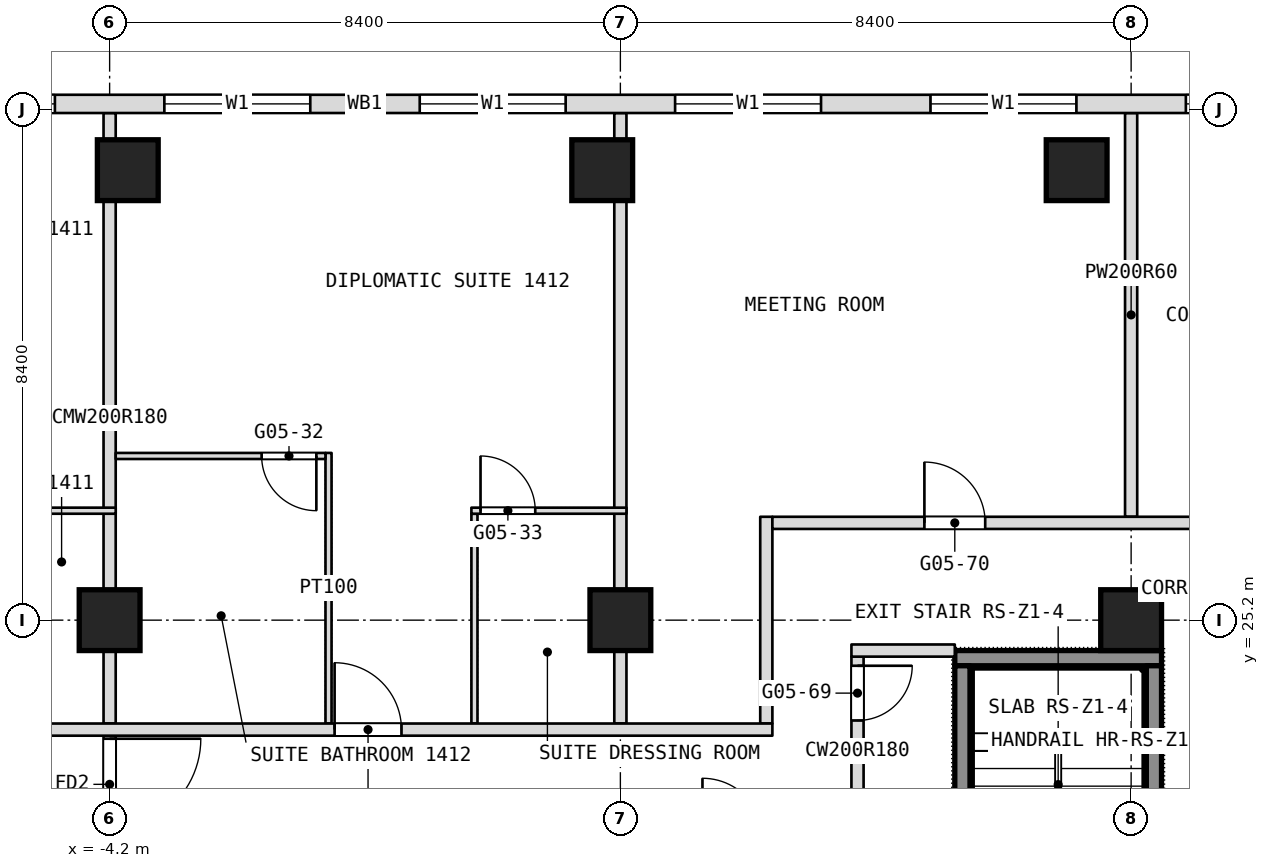
"""IFC4 building model, lengths in metres.
Left out: names, types, materials, properties, quantities, classifications, styles, units other than length and angle.
Written with IfcOpenShell. Run it as: python <this file> out.ifc"""

import sys

from ifc_helpers import new_model, si_unit, direction, frame, frame_2d, origin, origin_2d, place, context, subcontext, project, spatial, rectangle, extrude, element, fill, save


model = new_model("IFC4")
c1 = context("Model", 3, precision=1e-05, world=origin(), true_north=direction((0.0, 1.0)))
c2 = subcontext(c1, "Body", "Model", "MODEL_VIEW")
j1 = project(units=[si_unit("LENGTHUNIT", "METRE"), si_unit("PLANEANGLEUNIT", "RADIAN")], contexts=[c1])
p1 = place(None, origin())
s1 = spatial("IfcSite", under=j1, at=p1, CompositionType="ELEMENT")
p2 = place(p1, origin())
s2 = spatial("IfcBuilding", under=s1, at=p2, CompositionType="ELEMENT")
p3 = place(p2, frame((0.0, 0.0, 65.3)))
s3 = spatial("IfcBuildingStorey", under=s2, at=p3, CompositionType="ELEMENT", Elevation=65.3)
for number, where, z_axis, x_axis in (
    (1, (-4.2, 25.2, 0.0), (0.0, 0.0, 1.0), (1.0, 0.0, 0.0)),
    (2, (4.2, 25.2, 0.0), (0.0, 0.0, 1.0), (1.0, 0.0, 0.0)),
    (3, (12.6, 25.2, 0.0), (0.0, 0.0, 1.0), (1.0, 0.0, 0.0)),
    (4, (-3.901, 32.6, 0.0), (0.0, 0.0, 1.0), (1.0, 0.0, 0.0)),
    (5, (3.901, 32.6, 0.0), (0.0, 0.0, 1.0), (1.0, 0.0, 0.0)),
    (6, (11.704, 32.6, 0.0), (0.0, 0.0, 1.0), (1.0, 0.0, 0.0)),
):
    element("IfcColumn", number, at=place(p3, frame(where, z_axis=z_axis, x_axis=x_axis)), inside=s3, PredefinedType="COLUMN", context=c2, shape_type="SweptSolid", body=[
        extrude(rectangle(XDim=1.0, YDim=1.0, at=origin_2d()), origin(), (0.0, 0.0, 1.0), 3.6),
    ])
p4 = place(p3, frame((12.6, 26.9, 0.0), z_axis=(0.0, 0.0, 1.0), x_axis=(0.0, 1.0, 0.0)))
e7 = element("IfcWall", 7, at=p4, inside=s3, PredefinedType="PARTITIONING", context=c2, shape_type="SweptSolid", body=[
    extrude(rectangle(XDim=6.64, YDim=0.2, at=frame_2d((3.32, 0.0))), origin(), (0.0, 0.0, 1.0), 3.34),
])
p5 = place(p3, frame((8.1, 21.5, 0.0), z_axis=(0.0, 0.0, 1.0), x_axis=(0.0, 1.0, 0.0)))
e8 = element("IfcWall", 8, at=p5, inside=s3, PredefinedType="PARTITIONING", context=c2, shape_type="SweptSolid", body=[
    extrude(rectangle(XDim=3.1, YDim=0.2, at=frame_2d((1.55, 0.0))), origin(), (0.0, 0.0, 1.0), 3.34),
])
p6 = place(p5, frame((2.05, 0.0, 0.0)))
e9 = element("IfcOpeningElement", 9, at=p6, cuts=e8, PredefinedType="OPENING", context=c2, shape_type="SweptSolid", body=[
    extrude(rectangle(XDim=0.9, YDim=2.1, at=frame_2d((0.45, 1.05))), frame((0.0, 0.1, 0.0), z_axis=(0.0, -1.0, 0.0), x_axis=(1.0, 0.0, 0.0)), (0.0, 0.0, 1.0), 0.2),
])
p7 = place(p3, frame((6.6, 23.5, 0.0), z_axis=(0.0, 0.0, 1.0), x_axis=(0.0, 1.0, 0.0)))
e10 = element("IfcWall", 10, at=p7, inside=s3, PredefinedType="PARTITIONING", context=c2, shape_type="SweptSolid", body=[
    extrude(rectangle(XDim=3.4, YDim=0.2, at=frame_2d((1.7, 0.0))), origin(), (0.0, 0.0, 1.0), 3.34),
])
p8 = place(p3, frame((4.2, 23.5, 0.0), z_axis=(0.0, 0.0, 1.0), x_axis=(0.0, 1.0, 0.0)))
e11 = element("IfcWall", 11, at=p8, inside=s3, PredefinedType="PARTITIONING", context=c2, shape_type="SweptSolid", body=[
    extrude(rectangle(XDim=10.04, YDim=0.2, at=frame_2d((5.02, 0.0))), origin(), (0.0, 0.0, 1.0), 3.34),
])
p9 = place(p3, frame((1.8, 23.5, 0.0), z_axis=(0.0, 0.0, 1.0), x_axis=(0.0, 1.0, 0.0)))
e12 = element("IfcWall", 12, at=p9, inside=s3, PredefinedType="PARTITIONING", context=c2, shape_type="SweptSolid", body=[
    extrude(rectangle(XDim=3.45, YDim=0.1, at=frame_2d((1.725, 0.0))), origin(), (0.0, 0.0, 1.0), 3.34),
])
p10 = place(p3, frame((-0.6, 23.5, 0.0), z_axis=(0.0, 0.0, 1.0), x_axis=(0.0, 1.0, 0.0)))
e13 = element("IfcWall", 13, at=p10, inside=s3, PredefinedType="PARTITIONING", context=c2, shape_type="SweptSolid", body=[
    extrude(rectangle(XDim=4.45, YDim=0.1, at=frame_2d((2.225, 0.0))), origin(), (0.0, 0.0, 1.0), 3.34),
])
p11 = place(p3, frame((-4.2, 16.8, 0.0), z_axis=(0.0, 0.0, 1.0), x_axis=(0.0, 1.0, 0.0)))
e14 = element("IfcWall", 14, at=p11, inside=s3, PredefinedType="PARTITIONING", context=c2, shape_type="SweptSolid", body=[
    extrude(rectangle(XDim=6.7, YDim=0.2, at=frame_2d((3.35, 0.0))), origin(), (0.0, 0.0, 1.0), 3.34),
])
p12 = place(p11, frame((0.15, 0.0, 0.0)))
e15 = element("IfcOpeningElement", 15, at=p12, cuts=e14, PredefinedType="OPENING", context=c2, shape_type="SweptSolid", body=[
    extrude(rectangle(XDim=1.5, YDim=2.1, at=frame_2d((0.75, 1.05))), frame((0.0, 0.1, 0.0), z_axis=(0.0, -1.0, 0.0), x_axis=(1.0, 0.0, 0.0)), (0.0, 0.0, 1.0), 0.2),
])
p13 = place(p11, frame((4.95, 0.0, 0.0)))
e16 = element("IfcOpeningElement", 16, at=p13, cuts=e14, PredefinedType="OPENING", context=c2, shape_type="SweptSolid", body=[
    extrude(rectangle(XDim=1.5, YDim=2.1, at=frame_2d((0.75, 1.05))), frame((0.0, 0.1, 0.0), z_axis=(0.0, -1.0, 0.0), x_axis=(1.0, 0.0, 0.0)), (0.0, 0.0, 1.0), 0.2),
])
p14 = place(p3, frame((-4.2, 23.5, 0.0), z_axis=(0.0, 0.0, 1.0), x_axis=(0.0, 1.0, 0.0)))
e17 = element("IfcWall", 17, at=p14, inside=s3, PredefinedType="PARTITIONING", context=c2, shape_type="SweptSolid", body=[
    extrude(rectangle(XDim=10.04, YDim=0.2, at=frame_2d((5.02, 0.0))), origin(), (0.0, 0.0, 1.0), 3.34),
])
p15 = place(p3, frame((-16.7, 23.4, 0.0), z_axis=(0.0, 0.0, 1.0), x_axis=(1.0, 0.0, 0.0)))
e18 = element("IfcWall", 18, at=p15, inside=s3, PredefinedType="PARTITIONING", context=c2, shape_type="SweptSolid", body=[
    extrude(rectangle(XDim=23.4, YDim=0.2, at=frame_2d((11.7, 0.0))), origin(), (0.0, 0.0, 1.0), 3.34),
])
p16 = place(p15, frame((2.4, 0.0, 0.0)))
e19 = element("IfcOpeningElement", 19, at=p16, cuts=e18, PredefinedType="OPENING", context=c2, shape_type="SweptSolid", body=[
    extrude(rectangle(XDim=0.9, YDim=2.1, at=frame_2d((0.45, 1.05))), frame((0.0, 0.1, 0.0), z_axis=(0.0, -1.0, 0.0), x_axis=(1.0, 0.0, 0.0)), (0.0, 0.0, 1.0), 0.2),
])
p17 = place(p15, frame((5.65, 0.0, 0.0)))
e20 = element("IfcOpeningElement", 20, at=p17, cuts=e18, PredefinedType="OPENING", context=c2, shape_type="SweptSolid", body=[
    extrude(rectangle(XDim=1.1, YDim=2.1, at=frame_2d((0.55, 1.05))), frame((0.0, 0.1, 0.0), z_axis=(0.0, -1.0, 0.0), x_axis=(1.0, 0.0, 0.0)), (0.0, 0.0, 1.0), 0.2),
])
p18 = place(p15, frame((16.2, 0.0, 0.0)))
e21 = element("IfcOpeningElement", 21, at=p18, cuts=e18, PredefinedType="OPENING", context=c2, shape_type="SweptSolid", body=[
    extrude(rectangle(XDim=1.1, YDim=2.1, at=frame_2d((0.55, 1.05))), frame((0.0, 0.1, 0.0), z_axis=(0.0, -1.0, 0.0), x_axis=(1.0, 0.0, 0.0)), (0.0, 0.0, 1.0), 0.2),
])
p19 = place(p3, frame((8.0, 24.7, 0.0), z_axis=(0.0, 0.0, 1.0), x_axis=(1.0, 0.0, 0.0)))
e22 = element("IfcWall", 22, at=p19, inside=s3, PredefinedType="PARTITIONING", context=c2, shape_type="SweptSolid", body=[
    extrude(rectangle(XDim=1.7, YDim=0.2, at=frame_2d((0.85, 0.0))), origin(), (0.0, 0.0, 1.0), 3.34),
])
p20 = place(p3, frame((6.7, 26.8, 0.0), z_axis=(0.0, 0.0, 1.0), x_axis=(1.0, 0.0, 0.0)))
e23 = element("IfcWall", 23, at=p20, inside=s3, PredefinedType="PARTITIONING", context=c2, shape_type="SweptSolid", body=[
    extrude(rectangle(XDim=8.0, YDim=0.2, at=frame_2d((4.0, 0.0))), origin(), (0.0, 0.0, 1.0), 3.34),
])
p21 = place(p20, frame((2.5, 0.0, 0.0)))
e24 = element("IfcOpeningElement", 24, at=p21, cuts=e23, PredefinedType="OPENING", context=c2, shape_type="SweptSolid", body=[
    extrude(rectangle(XDim=1.0, YDim=2.1, at=frame_2d((0.5, 1.05))), frame((0.0, 0.1, 0.0), z_axis=(0.0, -1.0, 0.0), x_axis=(1.0, 0.0, 0.0)), (0.0, 0.0, 1.0), 0.2),
])
p22 = place(p3, frame((-6.65, 27.0, 0.0), z_axis=(0.0, 0.0, 1.0), x_axis=(1.0, 0.0, 0.0)))
e25 = element("IfcWall", 25, at=p22, inside=s3, PredefinedType="PARTITIONING", context=c2, shape_type="SweptSolid", body=[
    extrude(rectangle(XDim=2.55, YDim=0.1, at=frame_2d((1.275, 0.0))), origin(), (0.0, 0.0, 1.0), 3.34),
])
p23 = place(p3, frame((1.75, 27.0, 0.0), z_axis=(0.0, 0.0, 1.0), x_axis=(1.0, 0.0, 0.0)))
e26 = element("IfcWall", 26, at=p23, inside=s3, PredefinedType="PARTITIONING", context=c2, shape_type="SweptSolid", body=[
    extrude(rectangle(XDim=2.55, YDim=0.1, at=frame_2d((1.275, 0.0))), origin(), (0.0, 0.0, 1.0), 3.34),
])
p24 = place(p23, frame((0.15, 0.0, 0.0)))
e27 = element("IfcOpeningElement", 27, at=p24, cuts=e26, PredefinedType="OPENING", context=c2, shape_type="SweptSolid", body=[
    extrude(rectangle(XDim=0.9, YDim=2.1, at=frame_2d((0.45, 1.05))), frame((0.0, 0.05, 0.0), z_axis=(0.0, -1.0, 0.0), x_axis=(1.0, 0.0, 0.0)), (0.0, 0.0, 1.0), 0.1),
])
p25 = place(p3, frame((-4.1, 27.9, 0.0), z_axis=(0.0, 0.0, 1.0), x_axis=(1.0, 0.0, 0.0)))
e28 = element("IfcWall", 28, at=p25, inside=s3, PredefinedType="PARTITIONING", context=c2, shape_type="SweptSolid", body=[
    extrude(rectangle(XDim=3.45, YDim=0.1, at=frame_2d((1.725, 0.0))), origin(), (0.0, 0.0, 1.0), 3.34),
])
p26 = place(p25, frame((2.4, 0.0, 0.0)))
e29 = element("IfcOpeningElement", 29, at=p26, cuts=e28, PredefinedType="OPENING", context=c2, shape_type="SweptSolid", body=[
    extrude(rectangle(XDim=0.9, YDim=2.1, at=frame_2d((0.45, 1.05))), frame((0.0, 0.05, 0.0), z_axis=(0.0, -1.0, 0.0), x_axis=(1.0, 0.0, 0.0)), (0.0, 0.0, 1.0), 0.1),
])
p27 = place(p3, frame((23.406, 33.69, 0.0), z_axis=(0.0, 0.0, 1.0), x_axis=(-1.0, 0.0, 0.0)))
e30 = element("IfcWall", 30, at=p27, inside=s3, PredefinedType="NOTDEFINED", context=c2, shape_type="SweptSolid", body=[
    extrude(rectangle(XDim=46.812, YDim=0.3, at=frame_2d((23.406, 0.0))), origin(), (0.0, 0.0, 1.0), 3.6),
])
p28 = place(p27, frame((2.186, 0.0, 0.9)))
e31 = element("IfcOpeningElement", 31, at=p28, cuts=e30, PredefinedType="OPENING", context=c2, shape_type="SweptSolid", body=[
    extrude(rectangle(XDim=2.4, YDim=2.1, at=frame_2d((1.2, 1.05))), frame((0.0, 0.15, 0.0), z_axis=(0.0, -1.0, 0.0), x_axis=(1.0, 0.0, 0.0)), (0.0, 0.0, 1.0), 0.3),
])
p29 = place(p27, frame((7.506, 0.0, 0.9)))
e32 = element("IfcOpeningElement", 32, at=p29, cuts=e30, PredefinedType="OPENING", context=c2, shape_type="SweptSolid", body=[
    extrude(rectangle(XDim=2.4, YDim=2.1, at=frame_2d((1.2, 1.05))), frame((0.0, 0.15, 0.0), z_axis=(0.0, -1.0, 0.0), x_axis=(1.0, 0.0, 0.0)), (0.0, 0.0, 1.0), 0.3),
])
p30 = place(p27, frame((11.706, 0.0, 0.9)))
e33 = element("IfcOpeningElement", 33, at=p30, cuts=e30, PredefinedType="OPENING", context=c2, shape_type="SweptSolid", body=[
    extrude(rectangle(XDim=2.4, YDim=2.1, at=frame_2d((1.2, 1.05))), frame((0.0, 0.15, 0.0), z_axis=(0.0, -1.0, 0.0), x_axis=(1.0, 0.0, 0.0)), (0.0, 0.0, 1.0), 0.3),
])
p31 = place(p27, frame((15.906, 0.0, 0.9)))
e34 = element("IfcOpeningElement", 34, at=p31, cuts=e30, PredefinedType="OPENING", context=c2, shape_type="SweptSolid", body=[
    extrude(rectangle(XDim=2.4, YDim=2.1, at=frame_2d((1.2, 1.05))), frame((0.0, 0.15, 0.0), z_axis=(0.0, -1.0, 0.0), x_axis=(1.0, 0.0, 0.0)), (0.0, 0.0, 1.0), 0.3),
])
p32 = place(p27, frame((20.106, 0.0, 0.9)))
e35 = element("IfcOpeningElement", 35, at=p32, cuts=e30, PredefinedType="OPENING", context=c2, shape_type="SweptSolid", body=[
    extrude(rectangle(XDim=2.4, YDim=2.1, at=frame_2d((1.2, 1.05))), frame((0.0, 0.15, 0.0), z_axis=(0.0, -1.0, 0.0), x_axis=(1.0, 0.0, 0.0)), (0.0, 0.0, 1.0), 0.3),
])
p33 = place(p27, frame((24.306, 0.0, 0.9)))
e36 = element("IfcOpeningElement", 36, at=p33, cuts=e30, PredefinedType="OPENING", context=c2, shape_type="SweptSolid", body=[
    extrude(rectangle(XDim=2.4, YDim=2.1, at=frame_2d((1.2, 1.05))), frame((0.0, 0.15, 0.0), z_axis=(0.0, -1.0, 0.0), x_axis=(1.0, 0.0, 0.0)), (0.0, 0.0, 1.0), 0.3),
])
p34 = place(p27, frame((28.506, 0.0, 0.9)))
e37 = element("IfcOpeningElement", 37, at=p34, cuts=e30, PredefinedType="OPENING", context=c2, shape_type="SweptSolid", body=[
    extrude(rectangle(XDim=2.4, YDim=2.1, at=frame_2d((1.2, 1.05))), frame((0.0, 0.15, 0.0), z_axis=(0.0, -1.0, 0.0), x_axis=(1.0, 0.0, 0.0)), (0.0, 0.0, 1.0), 0.3),
])
p35 = place(p27, frame((32.706, 0.0, 0.9)))
e38 = element("IfcOpeningElement", 38, at=p35, cuts=e30, PredefinedType="OPENING", context=c2, shape_type="SweptSolid", body=[
    extrude(rectangle(XDim=2.4, YDim=2.1, at=frame_2d((1.2, 1.05))), frame((0.0, 0.15, 0.0), z_axis=(0.0, -1.0, 0.0), x_axis=(1.0, 0.0, 0.0)), (0.0, 0.0, 1.0), 0.3),
])
p36 = place(p27, frame((36.906, 0.0, 0.9)))
e39 = element("IfcOpeningElement", 39, at=p36, cuts=e30, PredefinedType="OPENING", context=c2, shape_type="SweptSolid", body=[
    extrude(rectangle(XDim=2.4, YDim=2.1, at=frame_2d((1.2, 1.05))), frame((0.0, 0.15, 0.0), z_axis=(0.0, -1.0, 0.0), x_axis=(1.0, 0.0, 0.0)), (0.0, 0.0, 1.0), 0.3),
])
p37 = place(p27, frame((42.226, 0.0, 0.9)))
e40 = element("IfcOpeningElement", 40, at=p37, cuts=e30, PredefinedType="OPENING", context=c2, shape_type="SweptSolid", body=[
    extrude(rectangle(XDim=2.4, YDim=2.1, at=frame_2d((1.2, 1.05))), frame((0.0, 0.15, 0.0), z_axis=(0.0, -1.0, 0.0), x_axis=(1.0, 0.0, 0.0)), (0.0, 0.0, 1.0), 0.3),
])
p38 = place(p3, frame((9.7, 24.575, 0.1), z_axis=(0.0, 0.0, 1.0), x_axis=(1.0, 0.0, 0.0)))
e41 = element("IfcWall", 41, at=p38, inside=s3, PredefinedType="SHEAR", context=c2, shape_type="SweptSolid", body=[
    extrude(rectangle(XDim=3.4, YDim=0.25, at=frame_2d((1.7, 0.0))), origin(), (0.0, 0.0, 1.0), 3.6),
])
p39 = place(p3, frame((9.825, 18.75, 0.1), z_axis=(0.0, 0.0, 1.0), x_axis=(0.0, 1.0, 0.0)))
e42 = element("IfcWall", 42, at=p39, inside=s3, PredefinedType="SHEAR", context=c2, shape_type="SweptSolid", body=[
    extrude(rectangle(XDim=5.7, YDim=0.25, at=frame_2d((2.85, 0.0))), origin(), (0.0, 0.0, 1.0), 3.6),
])
p40 = place(p39, frame((0.2, 0.0, 0.0)))
e43 = element("IfcOpeningElement", 43, at=p40, cuts=e42, PredefinedType="OPENING", context=c2, shape_type="SweptSolid", body=[
    extrude(rectangle(XDim=1.0, YDim=2.1, at=frame_2d((0.5, 1.05))), frame((0.0, 0.125, 0.0), z_axis=(0.0, -1.0, 0.0), x_axis=(1.0, 0.0, 0.0)), (0.0, 0.0, 1.0), 0.25),
])
p41 = place(p3, frame((12.975, 18.75, 0.1), z_axis=(0.0, 0.0, 1.0), x_axis=(0.0, 1.0, 0.0)))
e44 = element("IfcWall", 44, at=p41, inside=s3, PredefinedType="SHEAR", context=c2, shape_type="SweptSolid", body=[
    extrude(rectangle(XDim=5.7, YDim=0.25, at=frame_2d((2.85, 0.0))), origin(), (0.0, 0.0, 1.0), 3.6),
])
p42 = place(p6, origin())
e45 = element("IfcDoor", 45, at=p42, inside=s3, OperationType="SINGLE_SWING_LEFT", PredefinedType="DOOR", context=c2, shape_type="SweptSolid", body=[
    extrude(rectangle(XDim=0.9, YDim=2.1, at=frame_2d((0.45, 1.05))), frame((0.0, 0.025, 0.0), z_axis=(0.0, -1.0, 0.0), x_axis=(1.0, 0.0, 0.0)), (0.0, 0.0, 1.0), 0.05),
])
fill(e9, e45)
p43 = place(p18, origin())
e46 = element("IfcDoor", 46, at=p43, inside=s3, OperationType="SINGLE_SWING_LEFT", PredefinedType="DOOR", context=c2, shape_type="SweptSolid", body=[
    extrude(rectangle(XDim=1.1, YDim=2.1, at=frame_2d((0.55, 1.05))), frame((0.0, 0.025, 0.0), z_axis=(0.0, -1.0, 0.0), x_axis=(1.0, 0.0, 0.0)), (0.0, 0.0, 1.0), 0.05),
])
fill(e21, e46)
p44 = place(p21, origin())
e47 = element("IfcDoor", 47, at=p44, inside=s3, OperationType="SINGLE_SWING_RIGHT", PredefinedType="DOOR", context=c2, shape_type="SweptSolid", body=[
    extrude(rectangle(XDim=1.0, YDim=2.1, at=frame_2d((0.5, 1.05))), frame((0.0, 0.025, 0.0), z_axis=(0.0, -1.0, 0.0), x_axis=(1.0, 0.0, 0.0)), (0.0, 0.0, 1.0), 0.05),
])
fill(e24, e47)
p45 = place(p24, origin())
e48 = element("IfcDoor", 48, at=p45, inside=s3, OperationType="SINGLE_SWING_RIGHT", PredefinedType="DOOR", context=c2, shape_type="SweptSolid", body=[
    extrude(rectangle(XDim=0.9, YDim=2.1, at=frame_2d((0.45, 1.05))), frame((0.0, 0.025, 0.0), z_axis=(0.0, -1.0, 0.0), x_axis=(1.0, 0.0, 0.0)), (0.0, 0.0, 1.0), 0.05),
])
fill(e27, e48)
p46 = place(p26, origin())
e49 = element("IfcDoor", 49, at=p46, inside=s3, OperationType="SINGLE_SWING_LEFT", PredefinedType="DOOR", context=c2, shape_type="SweptSolid", body=[
    extrude(rectangle(XDim=0.9, YDim=2.1, at=frame_2d((0.45, 1.05))), frame((0.0, 0.025, 0.0), z_axis=(0.0, -1.0, 0.0), x_axis=(1.0, 0.0, 0.0)), (0.0, 0.0, 1.0), 0.05),
])
fill(e29, e49)
p47 = place(p29, origin())
e50 = element("IfcWindow", 50, at=p47, inside=s3, PartitioningType="SINGLE_PANEL", PredefinedType="WINDOW", context=c2, shape_type="SweptSolid", body=[
    extrude(rectangle(XDim=2.4, YDim=2.1, at=frame_2d((1.2, 1.05))), frame((0.0, 0.03, 0.0), z_axis=(0.0, -1.0, 0.0), x_axis=(1.0, 0.0, 0.0)), (0.0, 0.0, 1.0), 0.06),
])
fill(e32, e50)
p48 = place(p30, origin())
e51 = element("IfcWindow", 51, at=p48, inside=s3, PartitioningType="SINGLE_PANEL", PredefinedType="WINDOW", context=c2, shape_type="SweptSolid", body=[
    extrude(rectangle(XDim=2.4, YDim=2.1, at=frame_2d((1.2, 1.05))), frame((0.0, 0.03, 0.0), z_axis=(0.0, -1.0, 0.0), x_axis=(1.0, 0.0, 0.0)), (0.0, 0.0, 1.0), 0.06),
])
fill(e33, e51)
p49 = place(p31, origin())
e52 = element("IfcWindow", 52, at=p49, inside=s3, PartitioningType="SINGLE_PANEL", PredefinedType="WINDOW", context=c2, shape_type="SweptSolid", body=[
    extrude(rectangle(XDim=2.4, YDim=2.1, at=frame_2d((1.2, 1.05))), frame((0.0, 0.03, 0.0), z_axis=(0.0, -1.0, 0.0), x_axis=(1.0, 0.0, 0.0)), (0.0, 0.0, 1.0), 0.06),
])
fill(e34, e52)
p50 = place(p32, origin())
e53 = element("IfcWindow", 53, at=p50, inside=s3, PartitioningType="SINGLE_PANEL", PredefinedType="WINDOW", context=c2, shape_type="SweptSolid", body=[
    extrude(rectangle(XDim=2.4, YDim=2.1, at=frame_2d((1.2, 1.05))), frame((0.0, 0.03, 0.0), z_axis=(0.0, -1.0, 0.0), x_axis=(1.0, 0.0, 0.0)), (0.0, 0.0, 1.0), 0.06),
])
fill(e35, e53)
p51 = place(p33, origin())
e54 = element("IfcWindow", 54, at=p51, inside=s3, PartitioningType="SINGLE_PANEL", PredefinedType="WINDOW", context=c2, shape_type="SweptSolid", body=[
    extrude(rectangle(XDim=2.4, YDim=2.1, at=frame_2d((1.2, 1.05))), frame((0.0, 0.03, 0.0), z_axis=(0.0, -1.0, 0.0), x_axis=(1.0, 0.0, 0.0)), (0.0, 0.0, 1.0), 0.06),
])
fill(e36, e54)
p52 = place(p34, origin())
e55 = element("IfcWindow", 55, at=p52, inside=s3, PartitioningType="SINGLE_PANEL", PredefinedType="WINDOW", context=c2, shape_type="SweptSolid", body=[
    extrude(rectangle(XDim=2.4, YDim=2.1, at=frame_2d((1.2, 1.05))), frame((0.0, 0.03, 0.0), z_axis=(0.0, -1.0, 0.0), x_axis=(1.0, 0.0, 0.0)), (0.0, 0.0, 1.0), 0.06),
])
fill(e37, e55)
p53 = place(p13, origin())
e56 = element("IfcDoor", 56, at=p53, inside=s3, OperationType="DOUBLE_DOOR_DOUBLE_SWING", PredefinedType="DOOR", context=c2, shape_type="SweptSolid", body=[
    extrude(rectangle(XDim=1.5, YDim=2.1, at=frame_2d((0.75, 1.05))), frame((0.0, 0.025, 0.0), z_axis=(0.0, -1.0, 0.0), x_axis=(1.0, 0.0, 0.0)), (0.0, 0.0, 1.0), 0.05),
])
fill(e16, e56)
save(model, sys.argv[1])
